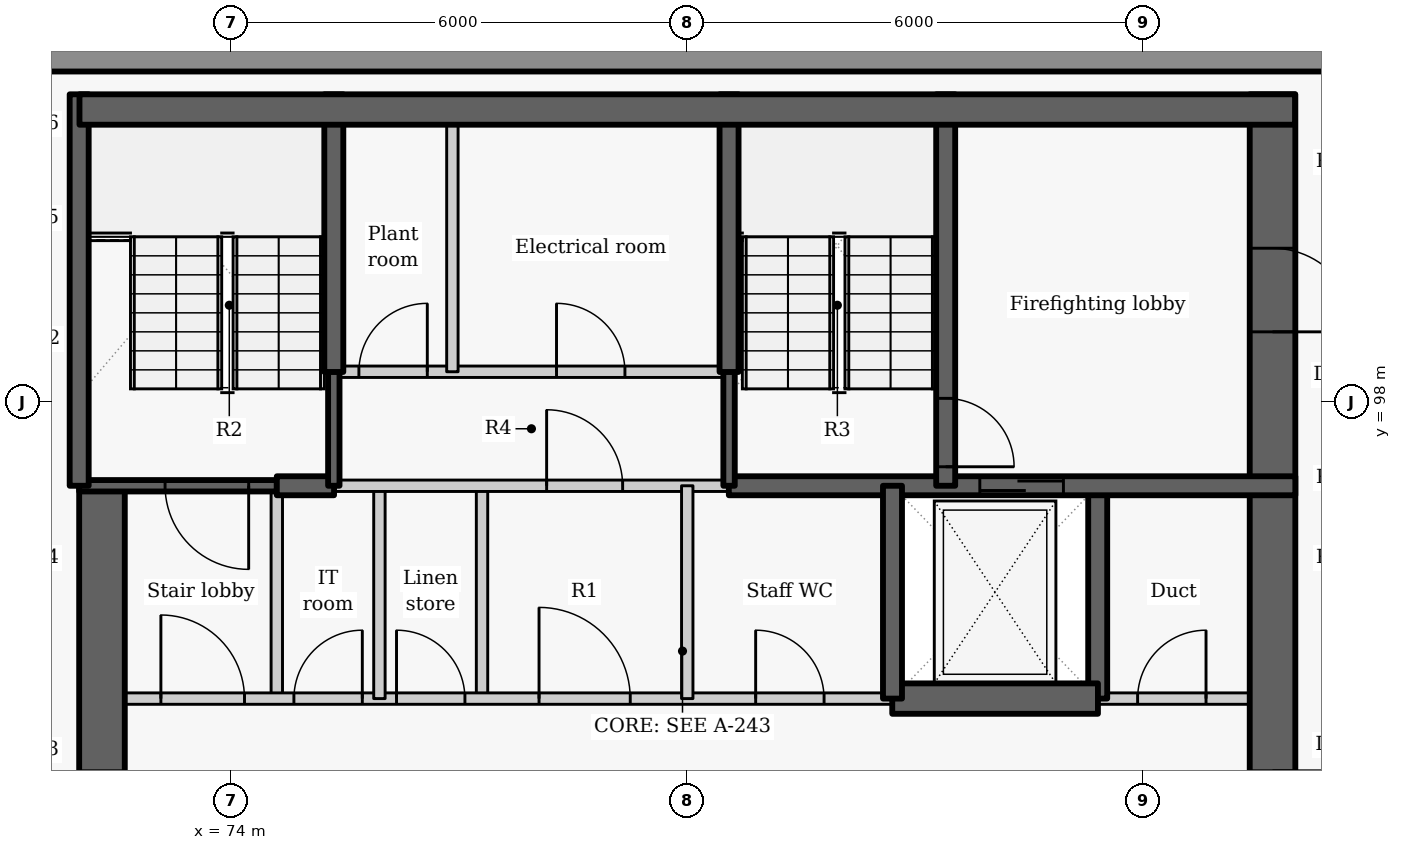
"""IFC4 building model, lengths in metres.
Left out: names, types, materials, properties, quantities, classifications, styles, units other than length and angle.
Written with IfcOpenShell. Run it as: python <this file> out.ifc"""

import sys

from ifc_helpers import new_model, si_unit, direction, frame, frame_2d, origin, place, context, subcontext, project, spatial, rectangle, extrude, element, fill, save


model = new_model("IFC4")
c1 = context("Model", 3, precision=1e-05, world=origin(), true_north=direction((0.0, 1.0)))
c2 = subcontext(c1, "Body", "Model", "MODEL_VIEW")
j1 = project(units=[si_unit("LENGTHUNIT", "METRE"), si_unit("PLANEANGLEUNIT", "RADIAN")], contexts=[c1])
p1 = place(None, origin())
s1 = spatial("IfcSite", under=j1, at=p1, CompositionType="ELEMENT")
p2 = place(p1, origin())
s2 = spatial("IfcBuilding", under=s1, at=p2, CompositionType="ELEMENT")
p3 = place(p2, frame((0.0, 0.0, 259.2)))
s3 = spatial("IfcBuildingStorey", under=s2, at=p3, CompositionType="ELEMENT", Elevation=259.2)
p4 = place(p3, frame((89.499, 102.5, 0.0), z_axis=(0.0, 0.0, 1.0), x_axis=(-1.0, 0.0, 0.0)))
e1 = element("IfcWall", 1, at=p4, inside=s3, PredefinedType="SOLIDWALL", context=c2, shape_type="SweptSolid", body=[
    extrude(rectangle(XDim=19.033, YDim=0.3, at=frame_2d((9.517, 0.0))), origin(), (0.0, 0.0, 1.0), 2.425),
])
p5 = place(p3, frame((74.6, 94.1, 0.0), z_axis=(0.0, 0.0, 1.0), x_axis=(0.0, 1.0, 0.0)))
e2 = element("IfcWall", 2, at=p5, inside=s3, PredefinedType="PARTITIONING", context=c2, shape_type="SweptSolid", body=[
    extrude(rectangle(XDim=2.8, YDim=0.15, at=frame_2d((1.4, 0.0))), origin(), (0.0, 0.0, 1.0), 3.025),
])
p6 = place(p3, frame((72.3, 87.8, -0.275), z_axis=(0.0, 0.0, 1.0), x_axis=(0.0, 1.0, 0.0)))
e3 = element("IfcWall", 3, at=p6, inside=s3, PredefinedType="SHEAR", context=c2, shape_type="SweptSolid", body=[
    extrude(rectangle(XDim=9.1, YDim=0.6, at=frame_2d((4.55, 0.0))), origin(), (0.0, 0.0, 1.0), 3.3),
])
p7 = place(p6, frame((3.85, 0.0, 0.275)))
e4 = element("IfcOpeningElement", 4, at=p7, cuts=e3, PredefinedType="OPENING", context=c2, shape_type="SweptSolid", body=[
    extrude(rectangle(XDim=1.5, YDim=2.1, at=frame_2d((0.75, 1.05))), frame((0.0, 0.31, 0.0), z_axis=(0.0, -1.0, 0.0), x_axis=(1.0, 0.0, 0.0)), (0.0, 0.0, 1.0), 0.62),
])
p8 = place(p3, frame((85.4, 94.1, -0.275), z_axis=(0.0, 0.0, 1.0), x_axis=(0.0, 1.0, 0.0)))
e5 = element("IfcWall", 5, at=p8, inside=s3, PredefinedType="SHEAR", context=c2, shape_type="SweptSolid", body=[
    extrude(rectangle(XDim=2.8, YDim=0.25, at=frame_2d((1.4, 0.0))), origin(), (0.0, 0.0, 1.0), 3.3),
])
p9 = place(p3, frame((87.7, 102.05, -0.275), z_axis=(0.0, 0.0, 1.0), x_axis=(0.0, -1.0, 0.0)))
e6 = element("IfcWall", 6, at=p9, inside=s3, PredefinedType="SHEAR", context=c2, shape_type="SweptSolid", body=[
    extrude(rectangle(XDim=14.25, YDim=0.6, at=frame_2d((7.125, 0.0))), origin(), (0.0, 0.0, 1.0), 3.3),
])
p10 = place(p9, frame((8.9, 0.0, 0.275)))
e7 = element("IfcOpeningElement", 7, at=p10, cuts=e6, PredefinedType="OPENING", context=c2, shape_type="SweptSolid", body=[
    extrude(rectangle(XDim=1.5, YDim=2.1, at=frame_2d((0.75, 1.05))), frame((0.0, 0.31, 0.0), z_axis=(0.0, -1.0, 0.0), x_axis=(1.0, 0.0, 0.0)), (0.0, 0.0, 1.0), 0.62),
])
p11 = place(p9, frame((2.025, 0.0, 0.275)))
e8 = element("IfcOpeningElement", 8, at=p11, cuts=e6, PredefinedType="OPENING", context=c2, shape_type="SweptSolid", body=[
    extrude(rectangle(XDim=1.1, YDim=2.1, at=frame_2d((0.55, 1.05))), frame((0.0, 0.31, 0.0), z_axis=(0.0, -1.0, 0.0), x_axis=(1.0, 0.0, 0.0)), (0.0, 0.0, 1.0), 0.62),
])
p12 = place(p3, frame((77.3, 94.1, 0.0), z_axis=(0.0, 0.0, 1.0), x_axis=(0.0, 1.0, 0.0)))
e9 = element("IfcWall", 9, at=p12, inside=s3, PredefinedType="PARTITIONING", context=c2, shape_type="SweptSolid", body=[
    extrude(rectangle(XDim=2.8, YDim=0.15, at=frame_2d((1.4, 0.0))), origin(), (0.0, 0.0, 1.0), 3.025),
])
p13 = place(p3, frame((72.0, 94.1, 0.0), z_axis=(0.0, 0.0, 1.0), x_axis=(1.0, 0.0, 0.0)))
e10 = element("IfcWall", 10, at=p13, inside=s3, PredefinedType="PARTITIONING", context=c2, shape_type="SweptSolid", body=[
    extrude(rectangle(XDim=10.703, YDim=0.15, at=frame_2d((5.352, 0.0))), origin(), (0.0, 0.0, 1.0), 3.025),
])
p14 = place(p13, frame((1.075, 0.0, 0.0)))
e11 = element("IfcOpeningElement", 11, at=p14, cuts=e10, PredefinedType="OPENING", context=c2, shape_type="SweptSolid", body=[
    extrude(rectangle(XDim=1.1, YDim=2.1, at=frame_2d((0.55, 1.05))), frame((0.0, 0.085, 0.0), z_axis=(0.0, -1.0, 0.0), x_axis=(1.0, 0.0, 0.0)), (0.0, 0.0, 1.0), 0.17),
])
p15 = place(p13, frame((2.825, 0.0, 0.0)))
e12 = element("IfcOpeningElement", 12, at=p15, cuts=e10, PredefinedType="OPENING", context=c2, shape_type="SweptSolid", body=[
    extrude(rectangle(XDim=0.9, YDim=2.1, at=frame_2d((0.45, 1.05))), frame((0.0, 0.085, 0.0), z_axis=(0.0, -1.0, 0.0), x_axis=(1.0, 0.0, 0.0)), (0.0, 0.0, 1.0), 0.17),
])
p16 = place(p13, frame((4.175, 0.0, 0.0)))
e13 = element("IfcOpeningElement", 13, at=p16, cuts=e10, PredefinedType="OPENING", context=c2, shape_type="SweptSolid", body=[
    extrude(rectangle(XDim=0.9, YDim=2.1, at=frame_2d((0.45, 1.05))), frame((0.0, 0.085, 0.0), z_axis=(0.0, -1.0, 0.0), x_axis=(1.0, 0.0, 0.0)), (0.0, 0.0, 1.0), 0.17),
])
p17 = place(p13, frame((6.05, 0.0, 0.0)))
e14 = element("IfcOpeningElement", 14, at=p17, cuts=e10, PredefinedType="OPENING", context=c2, shape_type="SweptSolid", body=[
    extrude(rectangle(XDim=1.2, YDim=2.1, at=frame_2d((0.6, 1.05))), frame((0.0, 0.085, 0.0), z_axis=(0.0, -1.0, 0.0), x_axis=(1.0, 0.0, 0.0)), (0.0, 0.0, 1.0), 0.17),
])
p18 = place(p13, frame((8.9, 0.0, 0.0)))
e15 = element("IfcOpeningElement", 15, at=p18, cuts=e10, PredefinedType="OPENING", context=c2, shape_type="SweptSolid", body=[
    extrude(rectangle(XDim=0.9, YDim=2.1, at=frame_2d((0.45, 1.05))), frame((0.0, 0.085, 0.0), z_axis=(0.0, -1.0, 0.0), x_axis=(1.0, 0.0, 0.0)), (0.0, 0.0, 1.0), 0.17),
])
p19 = place(p3, frame((85.397, 94.1, 0.0), z_axis=(0.0, 0.0, 1.0), x_axis=(1.0, 0.0, 0.0)))
e16 = element("IfcWall", 16, at=p19, inside=s3, PredefinedType="PARTITIONING", context=c2, shape_type="SweptSolid", body=[
    extrude(rectangle(XDim=2.603, YDim=0.15, at=frame_2d((1.302, 0.0))), origin(), (0.0, 0.0, 1.0), 3.025),
])
p20 = place(p19, frame((0.528, 0.0, 0.0)))
e17 = element("IfcOpeningElement", 17, at=p20, cuts=e16, PredefinedType="OPENING", context=c2, shape_type="SweptSolid", body=[
    extrude(rectangle(XDim=0.9, YDim=2.1, at=frame_2d((0.45, 1.05))), frame((0.0, 0.085, 0.0), z_axis=(0.0, -1.0, 0.0), x_axis=(1.0, 0.0, 0.0)), (0.0, 0.0, 1.0), 0.17),
])
p21 = place(p3, frame((82.697, 94.1, -0.275), z_axis=(0.0, 0.0, 1.0), x_axis=(1.0, 0.0, 0.0)))
e18 = element("IfcWall", 18, at=p21, inside=s3, PredefinedType="SHEAR", context=c2, shape_type="SweptSolid", body=[
    extrude(rectangle(XDim=2.706, YDim=0.4, at=frame_2d((1.353, 0.0))), origin(), (0.0, 0.0, 1.0), 3.3),
])
p22 = place(p3, frame((74.6, 96.9, -0.275), z_axis=(0.0, 0.0, 1.0), x_axis=(-1.0, 0.0, 0.0)))
e19 = element("IfcWall", 19, at=p22, inside=s3, PredefinedType="SHEAR", context=c2, shape_type="SweptSolid", body=[
    extrude(rectangle(XDim=2.6, YDim=0.15, at=frame_2d((1.3, 0.0))), origin(), (0.0, 0.0, 1.0), 3.3),
])
p23 = place(p22, frame((0.37, 0.0, 0.275)))
e20 = element("IfcOpeningElement", 20, at=p23, cuts=e19, PredefinedType="OPENING", context=c2, shape_type="SweptSolid", body=[
    extrude(rectangle(XDim=1.1, YDim=2.1, at=frame_2d((0.55, 1.05))), frame((0.0, 0.085, 0.0), z_axis=(0.0, -1.0, 0.0), x_axis=(1.0, 0.0, 0.0)), (0.0, 0.0, 1.0), 0.17),
])
p24 = place(p3, frame((75.95, 94.1, 0.0), z_axis=(0.0, 0.0, 1.0), x_axis=(0.0, 1.0, 0.0)))
e21 = element("IfcWall", 21, at=p24, inside=s3, PredefinedType="PARTITIONING", context=c2, shape_type="SweptSolid", body=[
    extrude(rectangle(XDim=2.8, YDim=0.15, at=frame_2d((1.4, 0.0))), origin(), (0.0, 0.0, 1.0), 3.025),
])
p25 = place(p3, frame((74.6, 96.9, -0.275), z_axis=(0.0, 0.0, 1.0), x_axis=(1.0, 0.0, 0.0)))
e22 = element("IfcWall", 22, at=p25, inside=s3, PredefinedType="SHEAR", context=c2, shape_type="SweptSolid", body=[
    extrude(rectangle(XDim=0.753, YDim=0.25, at=frame_2d((0.376, 0.0))), origin(), (0.0, 0.0, 1.0), 3.3),
])
p26 = place(p3, frame((80.547, 96.9, -0.275), z_axis=(0.0, 0.0, 1.0), x_axis=(1.0, 0.0, 0.0)))
e23 = element("IfcWall", 23, at=p26, inside=s3, PredefinedType="SHEAR", context=c2, shape_type="SweptSolid", body=[
    extrude(rectangle(XDim=7.453, YDim=0.25, at=frame_2d((3.727, 0.0))), origin(), (0.0, 0.0, 1.0), 3.3),
])
p27 = place(p26, frame((3.302, 0.0, 0.275)))
e24 = element("IfcOpeningElement", 24, at=p27, cuts=e23, PredefinedType="OPENING", context=c2, shape_type="SweptSolid", body=[
    extrude(rectangle(XDim=1.1, YDim=2.1, at=frame_2d((0.55, 1.05))), frame((0.0, 0.135, 0.0), z_axis=(0.0, -1.0, 0.0), x_axis=(1.0, 0.0, 0.0)), (0.0, 0.0, 1.0), 0.27),
])
p28 = place(p3, frame((75.347, 96.9, 0.0), z_axis=(0.0, 0.0, 1.0), x_axis=(1.0, 0.0, 0.0)))
e25 = element("IfcWall", 25, at=p28, inside=s3, PredefinedType="PARTITIONING", context=c2, shape_type="SweptSolid", body=[
    extrude(rectangle(XDim=5.206, YDim=0.15, at=frame_2d((2.603, 0.0))), origin(), (0.0, 0.0, 1.0), 3.025),
])
p29 = place(p28, frame((2.803, 0.0, 0.0)))
e26 = element("IfcOpeningElement", 26, at=p29, cuts=e25, PredefinedType="OPENING", context=c2, shape_type="SweptSolid", body=[
    extrude(rectangle(XDim=1.0, YDim=2.1, at=frame_2d((0.5, 1.05))), frame((0.0, 0.085, 0.0), z_axis=(0.0, -1.0, 0.0), x_axis=(1.0, 0.0, 0.0)), (0.0, 0.0, 1.0), 0.17),
])
p30 = place(p3, frame((80.0, 94.1, 0.0), z_axis=(0.0, 0.0, 1.0), x_axis=(0.0, 1.0, 0.0)))
e27 = element("IfcWall", 27, at=p30, inside=s3, PredefinedType="PARTITIONING", context=c2, shape_type="SweptSolid", body=[
    extrude(rectangle(XDim=2.8, YDim=0.15, at=frame_2d((1.4, 0.0))), origin(), (0.0, 0.0, 1.0), 3.025),
])
p31 = place(p3, frame((82.7, 94.1, -0.275), z_axis=(0.0, 0.0, 1.0), x_axis=(0.0, 1.0, 0.0)))
e28 = element("IfcWall", 28, at=p31, inside=s3, PredefinedType="SHEAR", context=c2, shape_type="SweptSolid", body=[
    extrude(rectangle(XDim=2.8, YDim=0.25, at=frame_2d((1.4, 0.0))), origin(), (0.0, 0.0, 1.0), 3.3),
])
p32 = place(p3, frame((75.35, 96.9, -0.275), z_axis=(0.0, 0.0, 1.0), x_axis=(0.0, 1.0, 0.0)))
e29 = element("IfcWall", 29, at=p32, inside=s3, PredefinedType="SHEAR", context=c2, shape_type="SweptSolid", body=[
    extrude(rectangle(XDim=1.503, YDim=0.15, at=frame_2d((0.751, 0.0))), origin(), (0.0, 0.0, 1.0), 3.3),
])
p33 = place(p3, frame((75.35, 98.397, -0.275), z_axis=(0.0, 0.0, 1.0), x_axis=(0.0, 1.0, 0.0)))
e30 = element("IfcWall", 30, at=p33, inside=s3, PredefinedType="SHEAR", context=c2, shape_type="SweptSolid", body=[
    extrude(rectangle(XDim=3.653, YDim=0.25, at=frame_2d((1.827, 0.0))), origin(), (0.0, 0.0, 1.0), 3.3),
])
p34 = place(p3, frame((72.0, 96.9, -0.275), z_axis=(0.0, 0.0, 1.0), x_axis=(0.0, 1.0, 0.0)))
e31 = element("IfcWall", 31, at=p34, inside=s3, PredefinedType="SHEAR", context=c2, shape_type="SweptSolid", body=[
    extrude(rectangle(XDim=5.15, YDim=0.25, at=frame_2d((2.575, 0.0))), origin(), (0.0, 0.0, 1.0), 3.3),
])
p35 = place(p3, frame((83.4, 102.05, -0.275), z_axis=(0.0, 0.0, 1.0), x_axis=(0.0, -1.0, 0.0)))
e32 = element("IfcWall", 32, at=p35, inside=s3, PredefinedType="SHEAR", context=c2, shape_type="SweptSolid", body=[
    extrude(rectangle(XDim=5.15, YDim=0.25, at=frame_2d((2.575, 0.0))), origin(), (0.0, 0.0, 1.0), 3.3),
])
p36 = place(p35, frame((4.0, 0.0, 0.275)))
e33 = element("IfcOpeningElement", 33, at=p36, cuts=e32, PredefinedType="OPENING", context=c2, shape_type="SweptSolid", body=[
    extrude(rectangle(XDim=0.9, YDim=2.1, at=frame_2d((0.45, 1.05))), frame((0.0, 0.135, 0.0), z_axis=(0.0, -1.0, 0.0), x_axis=(1.0, 0.0, 0.0)), (0.0, 0.0, 1.0), 0.27),
])
p37 = place(p3, frame((80.55, 96.9, -0.275), z_axis=(0.0, 0.0, 1.0), x_axis=(0.0, 1.0, 0.0)))
e34 = element("IfcWall", 34, at=p37, inside=s3, PredefinedType="SHEAR", context=c2, shape_type="SweptSolid", body=[
    extrude(rectangle(XDim=1.503, YDim=0.15, at=frame_2d((0.751, 0.0))), origin(), (0.0, 0.0, 1.0), 3.3),
])
p38 = place(p3, frame((80.55, 98.397, -0.275), z_axis=(0.0, 0.0, 1.0), x_axis=(0.0, 1.0, 0.0)))
e35 = element("IfcWall", 35, at=p38, inside=s3, PredefinedType="SHEAR", context=c2, shape_type="SweptSolid", body=[
    extrude(rectangle(XDim=3.653, YDim=0.25, at=frame_2d((1.827, 0.0))), origin(), (0.0, 0.0, 1.0), 3.3),
])
p39 = place(p3, frame((75.35, 98.4, 0.0), z_axis=(0.0, 0.0, 1.0), x_axis=(1.0, 0.0, 0.0)))
e36 = element("IfcWall", 36, at=p39, inside=s3, PredefinedType="PARTITIONING", context=c2, shape_type="SweptSolid", body=[
    extrude(rectangle(XDim=5.2, YDim=0.15, at=frame_2d((2.6, 0.0))), origin(), (0.0, 0.0, 1.0), 3.025),
])
p40 = place(p39, frame((0.33, 0.0, 0.0)))
e37 = element("IfcOpeningElement", 37, at=p40, cuts=e36, PredefinedType="OPENING", context=c2, shape_type="SweptSolid", body=[
    extrude(rectangle(XDim=0.9, YDim=2.1, at=frame_2d((0.45, 1.05))), frame((0.0, 0.085, 0.0), z_axis=(0.0, -1.0, 0.0), x_axis=(1.0, 0.0, 0.0)), (0.0, 0.0, 1.0), 0.17),
])
p41 = place(p39, frame((2.93, 0.0, 0.0)))
e38 = element("IfcOpeningElement", 38, at=p41, cuts=e36, PredefinedType="OPENING", context=c2, shape_type="SweptSolid", body=[
    extrude(rectangle(XDim=0.9, YDim=2.1, at=frame_2d((0.45, 1.05))), frame((0.0, 0.085, 0.0), z_axis=(0.0, -1.0, 0.0), x_axis=(1.0, 0.0, 0.0)), (0.0, 0.0, 1.0), 0.17),
])
p42 = place(p3, frame((76.91, 98.4, 0.0), z_axis=(0.0, 0.0, 1.0), x_axis=(0.0, 1.0, 0.0)))
e39 = element("IfcWall", 39, at=p42, inside=s3, PredefinedType="PARTITIONING", context=c2, shape_type="SweptSolid", body=[
    extrude(rectangle(XDim=3.65, YDim=0.15, at=frame_2d((1.825, 0.0))), origin(), (0.0, 0.0, 1.0), 3.025),
])
p43 = place(p3, frame((72.004, 101.85, -0.275), z_axis=(0.0, 0.0, 1.0), x_axis=(1.0, 0.0, 0.0)))
e40 = element("IfcWall", 40, at=p43, inside=s3, PredefinedType="SHEAR", context=c2, shape_type="SweptSolid", body=[
    extrude(rectangle(XDim=15.992, YDim=0.4, at=frame_2d((7.996, 0.0))), origin(), (0.0, 0.0, 1.0), 3.3),
])
p44 = place(p14, origin())
e41 = element("IfcDoor", 41, at=p44, inside=s3, OperationType="SINGLE_SWING_LEFT", PredefinedType="DOOR", context=c2, shape_type="SweptSolid", body=[
    extrude(rectangle(XDim=1.1, YDim=2.1, at=frame_2d((0.55, 1.05))), frame((0.0, 0.025, 0.0), z_axis=(0.0, -1.0, 0.0), x_axis=(1.0, 0.0, 0.0)), (0.0, 0.0, 1.0), 0.05),
])
fill(e11, e41)
p45 = place(p15, origin())
e42 = element("IfcDoor", 42, at=p45, inside=s3, OperationType="SINGLE_SWING_RIGHT", PredefinedType="DOOR", context=c2, shape_type="SweptSolid", body=[
    extrude(rectangle(XDim=0.9, YDim=2.1, at=frame_2d((0.45, 1.05))), frame((0.0, 0.025, 0.0), z_axis=(0.0, -1.0, 0.0), x_axis=(1.0, 0.0, 0.0)), (0.0, 0.0, 1.0), 0.05),
])
fill(e12, e42)
p46 = place(p16, origin())
e43 = element("IfcDoor", 43, at=p46, inside=s3, OperationType="SINGLE_SWING_LEFT", PredefinedType="DOOR", context=c2, shape_type="SweptSolid", body=[
    extrude(rectangle(XDim=0.9, YDim=2.1, at=frame_2d((0.45, 1.05))), frame((0.0, 0.025, 0.0), z_axis=(0.0, -1.0, 0.0), x_axis=(1.0, 0.0, 0.0)), (0.0, 0.0, 1.0), 0.05),
])
fill(e13, e43)
p47 = place(p17, origin())
e44 = element("IfcDoor", 44, at=p47, inside=s3, OperationType="DOUBLE_DOOR_SINGLE_SWING", PredefinedType="DOOR", context=c2, shape_type="SweptSolid", body=[
    extrude(rectangle(XDim=1.2, YDim=2.1, at=frame_2d((0.6, 1.05))), frame((0.0, 0.025, 0.0), z_axis=(0.0, -1.0, 0.0), x_axis=(1.0, 0.0, 0.0)), (0.0, 0.0, 1.0), 0.05),
])
fill(e14, e44)
p48 = place(p18, origin())
e45 = element("IfcDoor", 45, at=p48, inside=s3, OperationType="SINGLE_SWING_LEFT", PredefinedType="DOOR", context=c2, shape_type="SweptSolid", body=[
    extrude(rectangle(XDim=0.9, YDim=2.1, at=frame_2d((0.45, 1.05))), frame((0.0, 0.025, 0.0), z_axis=(0.0, -1.0, 0.0), x_axis=(1.0, 0.0, 0.0)), (0.0, 0.0, 1.0), 0.05),
])
fill(e15, e45)
p49 = place(p27, origin())
e46 = element("IfcDoor", 46, at=p49, inside=s3, OperationType="SLIDING_TO_LEFT", PredefinedType="DOOR", context=c2, shape_type="SweptSolid", body=[
    extrude(rectangle(XDim=1.1, YDim=2.1, at=frame_2d((0.55, 1.05))), frame((0.0, 0.025, 0.0), z_axis=(0.0, -1.0, 0.0), x_axis=(1.0, 0.0, 0.0)), (0.0, 0.0, 1.0), 0.05),
])
fill(e24, e46)
p50 = place(p20, origin())
e47 = element("IfcDoor", 47, at=p50, inside=s3, OperationType="SINGLE_SWING_RIGHT", PredefinedType="DOOR", context=c2, shape_type="SweptSolid", body=[
    extrude(rectangle(XDim=0.9, YDim=2.1, at=frame_2d((0.45, 1.05))), frame((0.0, 0.025, 0.0), z_axis=(0.0, -1.0, 0.0), x_axis=(1.0, 0.0, 0.0)), (0.0, 0.0, 1.0), 0.05),
])
fill(e17, e47)
p51 = place(p29, origin())
e48 = element("IfcDoor", 48, at=p51, inside=s3, OperationType="SINGLE_SWING_LEFT", PredefinedType="DOOR", context=c2, shape_type="SweptSolid", body=[
    extrude(rectangle(XDim=1.0, YDim=2.1, at=frame_2d((0.5, 1.05))), frame((0.0, 0.025, 0.0), z_axis=(0.0, -1.0, 0.0), x_axis=(1.0, 0.0, 0.0)), (0.0, 0.0, 1.0), 0.05),
])
fill(e26, e48)
p52 = place(p40, origin())
e49 = element("IfcDoor", 49, at=p52, inside=s3, OperationType="SINGLE_SWING_RIGHT", PredefinedType="DOOR", context=c2, shape_type="SweptSolid", body=[
    extrude(rectangle(XDim=0.9, YDim=2.1, at=frame_2d((0.45, 1.05))), frame((0.0, 0.025, 0.0), z_axis=(0.0, -1.0, 0.0), x_axis=(1.0, 0.0, 0.0)), (0.0, 0.0, 1.0), 0.05),
])
fill(e37, e49)
p53 = place(p41, origin())
e50 = element("IfcDoor", 50, at=p53, inside=s3, OperationType="SINGLE_SWING_LEFT", PredefinedType="DOOR", context=c2, shape_type="SweptSolid", body=[
    extrude(rectangle(XDim=0.9, YDim=2.1, at=frame_2d((0.45, 1.05))), frame((0.0, 0.025, 0.0), z_axis=(0.0, -1.0, 0.0), x_axis=(1.0, 0.0, 0.0)), (0.0, 0.0, 1.0), 0.05),
])
fill(e38, e50)
p54 = place(p23, origin())
e51 = element("IfcDoor", 51, at=p54, inside=s3, OperationType="SINGLE_SWING_LEFT", PredefinedType="DOOR", context=c2, shape_type="SweptSolid", body=[
    extrude(rectangle(XDim=1.1, YDim=2.1, at=frame_2d((0.55, 1.05))), frame((0.0, 0.025, 0.0), z_axis=(0.0, -1.0, 0.0), x_axis=(1.0, 0.0, 0.0)), (0.0, 0.0, 1.0), 0.05),
])
fill(e20, e51)
p55 = place(p36, origin())
e52 = element("IfcDoor", 52, at=p55, inside=s3, OperationType="SINGLE_SWING_RIGHT", PredefinedType="DOOR", context=c2, shape_type="SweptSolid", body=[
    extrude(rectangle(XDim=0.9, YDim=2.1, at=frame_2d((0.45, 1.05))), frame((0.0, 0.025, 0.0), z_axis=(0.0, -1.0, 0.0), x_axis=(1.0, 0.0, 0.0)), (0.0, 0.0, 1.0), 0.05),
])
fill(e33, e52)
p56 = place(p10, origin())
e53 = element("IfcDoor", 53, at=p56, inside=s3, OperationType="DOUBLE_DOOR_SINGLE_SWING", PredefinedType="DOOR", context=c2, shape_type="SweptSolid", body=[
    extrude(rectangle(XDim=1.5, YDim=2.1, at=frame_2d((0.75, 1.05))), frame((0.0, 0.025, 0.0), z_axis=(0.0, -1.0, 0.0), x_axis=(1.0, 0.0, 0.0)), (0.0, 0.0, 1.0), 0.05),
])
fill(e7, e53)
p57 = place(p7, origin())
e54 = element("IfcDoor", 54, at=p57, inside=s3, OperationType="DOUBLE_DOOR_SINGLE_SWING", PredefinedType="DOOR", context=c2, shape_type="SweptSolid", body=[
    extrude(rectangle(XDim=1.5, YDim=2.1, at=frame_2d((0.75, 1.05))), frame((0.0, 0.025, 0.0), z_axis=(0.0, -1.0, 0.0), x_axis=(1.0, 0.0, 0.0)), (0.0, 0.0, 1.0), 0.05),
])
fill(e4, e54)
p58 = place(p11, origin())
e55 = element("IfcDoor", 55, at=p58, inside=s3, OperationType="SINGLE_SWING_RIGHT", PredefinedType="DOOR", context=c2, shape_type="SweptSolid", body=[
    extrude(rectangle(XDim=1.1, YDim=2.1, at=frame_2d((0.55, 1.05))), frame((0.0, 0.025, 0.0), z_axis=(0.0, -1.0, 0.0), x_axis=(1.0, 0.0, 0.0)), (0.0, 0.0, 1.0), 0.05),
])
fill(e8, e55)
save(model, sys.argv[1])
